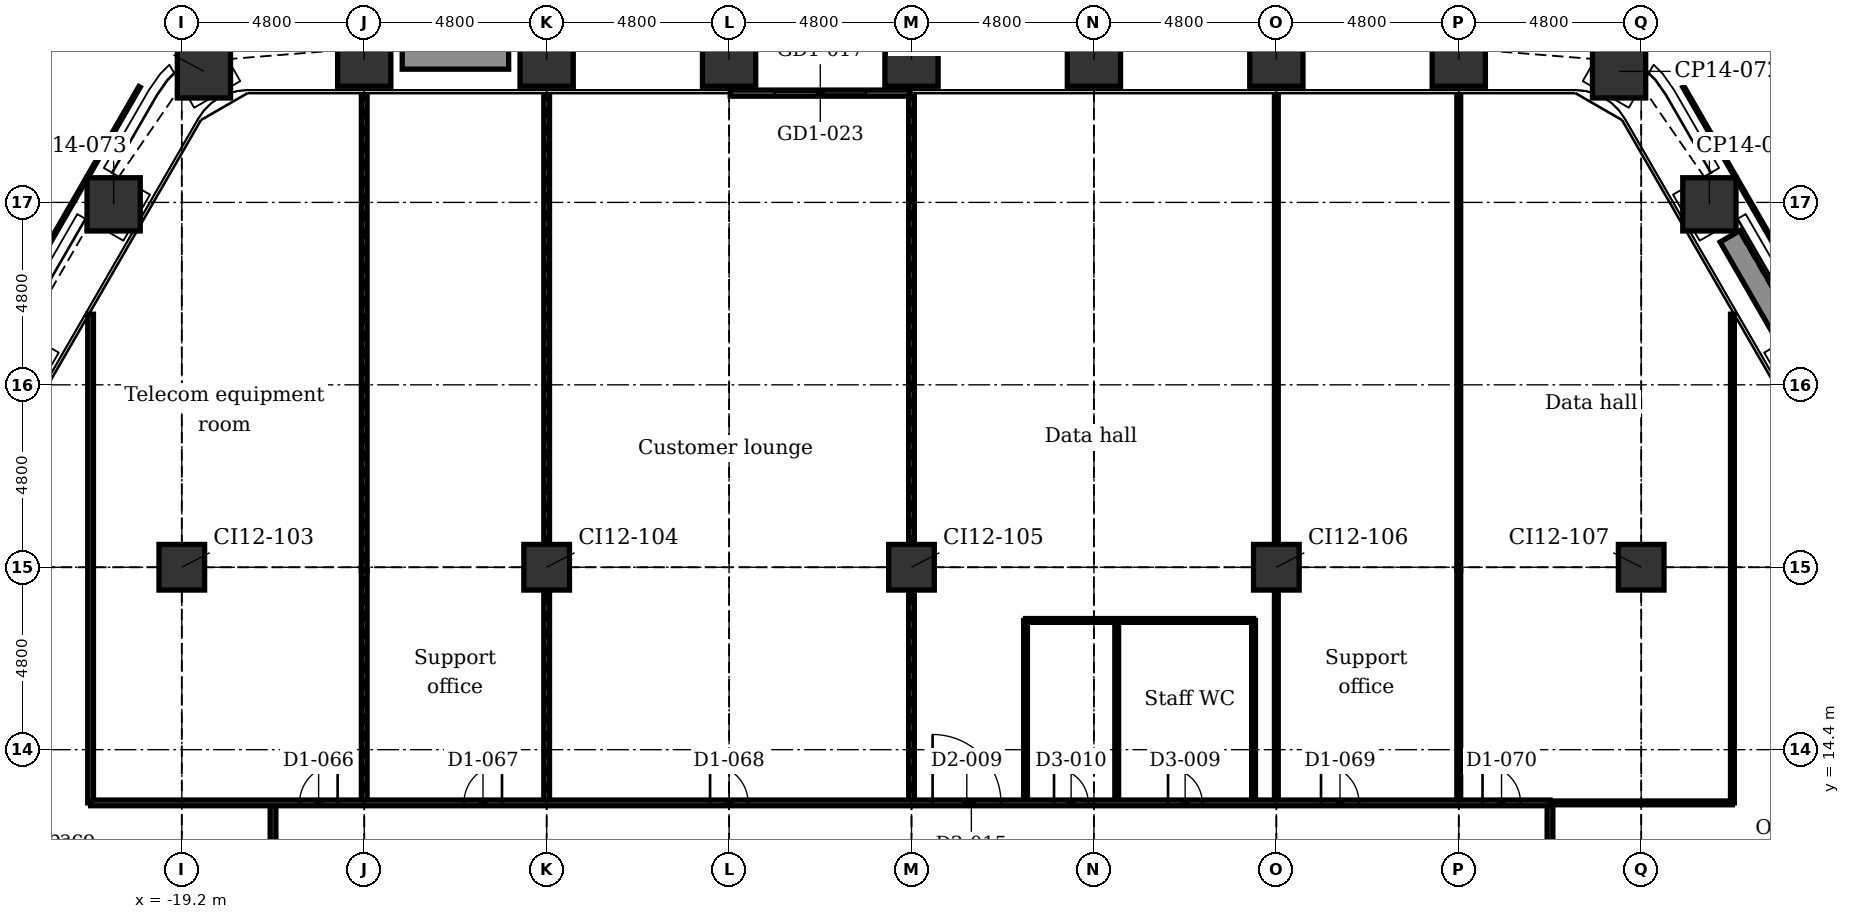
"""IFC4 building model, lengths in metres.
Left out: names, types, materials, properties, quantities, classifications, styles, units other than length and angle.
Written with IfcOpenShell. Run it as: python <this file> out.ifc"""

import sys

from ifc_helpers import new_model, si_unit, direction, frame, frame_2d, origin, origin_2d, place, context, subcontext, project, spatial, rectangle, extrude, element, fill, save


model = new_model("IFC4")
c1 = context("Model", 3, precision=1e-05, world=origin(), true_north=direction((0.0, 1.0)))
c2 = subcontext(c1, "Body", "Model", "MODEL_VIEW")
j1 = project(units=[si_unit("LENGTHUNIT", "METRE"), si_unit("PLANEANGLEUNIT", "RADIAN")], contexts=[c1])
p1 = place(None, origin())
s1 = spatial("IfcSite", under=j1, at=p1, CompositionType="ELEMENT")
p2 = place(p1, origin())
s2 = spatial("IfcBuilding", under=s1, at=p2, CompositionType="ELEMENT")
p3 = place(p2, frame((0.0, 0.0, 22.4)))
s3 = spatial("IfcBuildingStorey", under=s2, at=p3, CompositionType="ELEMENT", Elevation=22.4)
for number, where, z_axis, x_axis in (
    (1, (-18.618, 32.247, -0.25), (0.0, 0.0, 1.0), (0.866, 0.5, 0.0)),
    (2, (-14.4, 32.555, -0.25), (0.0, 0.0, 1.0), (1.0, 0.0, 0.0)),
    (3, (-9.6, 32.555, -0.25), (0.0, 0.0, 1.0), (1.0, 0.0, 0.0)),
    (4, (-4.8, 32.555, -0.25), (0.0, 0.0, 1.0), (1.0, 0.0, 0.0)),
    (5, (0.0, 32.555, -0.25), (0.0, 0.0, 1.0), (1.0, 0.0, 0.0)),
    (6, (4.8, 32.555, -0.25), (0.0, 0.0, 1.0), (1.0, 0.0, 0.0)),
    (7, (9.6, 32.555, -0.25), (0.0, 0.0, 1.0), (1.0, 0.0, 0.0)),
    (8, (14.4, 32.555, -0.25), (0.0, 0.0, 1.0), (1.0, 0.0, 0.0)),
    (9, (18.618, 32.247, -0.25), (0.0, 0.0, 1.0), (0.5, 0.866, 0.0)),
    (10, (20.994, 28.749, -0.25), (0.0, 0.0, 1.0), (0.866, 0.5, 0.0)),
    (11, (23.394, 24.592, -0.25), (0.0, 0.0, 1.0), (0.866, 0.5, 0.0)),
    (12, (-23.394, 24.592, -0.25), (0.0, 0.0, 1.0), (0.5, 0.866, 0.0)),
    (13, (-20.994, 28.749, -0.25), (0.0, 0.0, 1.0), (0.5, 0.866, 0.0)),
):
    element("IfcColumn", number, at=place(p3, frame(where, z_axis=z_axis, x_axis=x_axis)), inside=s3, PredefinedType="COLUMN", context=c2, shape_type="SweptSolid", body=[
        extrude(rectangle(XDim=1.4, YDim=1.4, at=origin_2d()), origin(), (0.0, 0.0, 1.0), 5.5),
    ])
for number, where, z_axis, x_axis in (
    (14, (-19.2, 19.2, -0.25), (0.0, 0.0, 1.0), (1.0, 0.0, 0.0)),
    (15, (-9.6, 19.2, -0.25), (0.0, 0.0, 1.0), (1.0, 0.0, 0.0)),
    (16, (0.0, 19.2, -0.25), (0.0, 0.0, 1.0), (1.0, 0.0, 0.0)),
    (17, (9.6, 19.2, -0.25), (0.0, 0.0, 1.0), (1.0, 0.0, 0.0)),
    (18, (19.2, 19.2, -0.25), (0.0, 0.0, 1.0), (1.0, 0.0, 0.0)),
):
    element("IfcColumn", number, at=place(p3, frame(where, z_axis=z_axis, x_axis=x_axis)), inside=s3, PredefinedType="COLUMN", context=c2, shape_type="SweptSolid", body=[
        extrude(rectangle(XDim=1.2, YDim=1.2, at=origin_2d()), origin(), (0.0, 0.0, 1.0), 5.5),
    ])
p4 = place(p3, frame((-4.77, 31.675, 0.0), z_axis=(0.0, 0.0, 1.0), x_axis=(1.0, 0.0, 0.0)))
e19 = element("IfcWall", 19, at=p4, inside=s3, PredefinedType="PARTITIONING", context=c2, shape_type="SweptSolid", body=[
    extrude(rectangle(XDim=4.74, YDim=0.16, at=frame_2d((2.37, 0.0))), origin(), (0.0, 0.0, 1.0), 5.25),
])
p5 = place(p4, frame((1.17, 0.0, 0.0)))
e20 = element("IfcOpeningElement", 20, at=p5, cuts=e19, PredefinedType="OPENING", context=c2, shape_type="SweptSolid", body=[
    extrude(rectangle(XDim=2.4, YDim=2.4, at=frame_2d((1.2, 1.2))), frame((0.0, 0.09, 0.0), z_axis=(0.0, -1.0, 0.0), x_axis=(1.0, 0.0, 0.0)), (0.0, 0.0, 1.0), 0.18),
])
for number, where, z_axis, x_axis in (
    (21, (-13.4, 32.605, 0.0), (0.0, 0.0, 1.0), (1.0, 0.0, 0.0)),
    (22, (21.537, 27.907, 0.0), (0.0, 0.0, 1.0), (0.5, -0.866, 0.0)),
):
    element("IfcWall", number, at=place(p3, frame(where, z_axis=z_axis, x_axis=x_axis)), inside=s3, PredefinedType="USERDEFINED", context=c2, shape_type="SweptSolid", body=[
        extrude(rectangle(XDim=2.8, YDim=0.6, at=frame_2d((1.4, 0.0))), origin(), (0.0, 0.0, 1.0), 0.7),
    ])
p6 = place(p3, frame((21.6, 13.0, 0.0), z_axis=(0.0, 0.0, 1.0), x_axis=(0.0, 1.0, 0.0)))
e23 = element("IfcWall", 23, at=p6, inside=s3, PredefinedType="PARTITIONING", context=c2, shape_type="SweptSolid", body=[
    extrude(rectangle(XDim=12.858, YDim=0.1, at=frame_2d((6.429, 0.0))), origin(), (0.0, 0.0, 1.0), 5.25),
])
p7 = place(p3, frame((16.8, 3.95, 0.0), z_axis=(0.0, 0.0, 1.0), x_axis=(0.0, 1.0, 0.0)))
e24 = element("IfcWall", 24, at=p7, inside=s3, PredefinedType="PARTITIONING", context=c2, shape_type="SweptSolid", body=[
    extrude(rectangle(XDim=9.05, YDim=0.15, at=frame_2d((4.525, 0.0))), origin(), (0.0, 0.0, 1.0), 5.25),
])
p8 = place(p7, frame((0.755, 0.0, 0.0)))
e25 = element("IfcOpeningElement", 25, at=p8, cuts=e24, PredefinedType="OPENING", context=c2, shape_type="SweptSolid", body=[
    extrude(rectangle(XDim=1.0, YDim=2.1, at=frame_2d((0.5, 1.05))), frame((0.0, 0.085, 0.0), z_axis=(0.0, -1.0, 0.0), x_axis=(1.0, 0.0, 0.0)), (0.0, 0.0, 1.0), 0.17),
])
p9 = place(p7, frame((3.85, 0.0, 0.0)))
e26 = element("IfcOpeningElement", 26, at=p9, cuts=e24, PredefinedType="OPENING", context=c2, shape_type="SweptSolid", body=[
    extrude(rectangle(XDim=1.0, YDim=2.1, at=frame_2d((0.5, 1.05))), frame((0.0, 0.085, 0.0), z_axis=(0.0, -1.0, 0.0), x_axis=(1.0, 0.0, 0.0)), (0.0, 0.0, 1.0), 0.17),
])
p10 = place(p7, frame((7.05, 0.0, 0.0)))
e27 = element("IfcOpeningElement", 27, at=p10, cuts=e24, PredefinedType="OPENING", context=c2, shape_type="SweptSolid", body=[
    extrude(rectangle(XDim=1.0, YDim=2.1, at=frame_2d((0.5, 1.05))), frame((0.0, 0.085, 0.0), z_axis=(0.0, -1.0, 0.0), x_axis=(1.0, 0.0, 0.0)), (0.0, 0.0, 1.0), 0.17),
])
p11 = place(p3, frame((14.4, 19.113, 0.0), z_axis=(0.0, 0.0, 1.0), x_axis=(0.0, 1.0, 0.0)))
e28 = element("IfcWall", 28, at=p11, inside=s3, PredefinedType="PARTITIONING", context=c2, shape_type="SweptSolid", body=[
    extrude(rectangle(XDim=12.472, YDim=0.1, at=frame_2d((6.236, 0.0))), origin(), (0.0, 0.0, 1.0), 4.566),
])
p12 = place(p3, frame((14.4, 13.0, 0.0), z_axis=(0.0, 0.0, 1.0), x_axis=(0.0, 1.0, 0.0)))
e29 = element("IfcWall", 29, at=p12, inside=s3, PredefinedType="PARTITIONING", context=c2, shape_type="SweptSolid", body=[
    extrude(rectangle(XDim=6.113, YDim=0.1, at=frame_2d((3.057, 0.0))), origin(), (0.0, 0.0, 1.0), 4.793),
])
p13 = place(p3, frame((9.6, 13.0, 0.0), z_axis=(0.0, 0.0, 1.0), x_axis=(0.0, 1.0, 0.0)))
e30 = element("IfcWall", 30, at=p13, inside=s3, PredefinedType="PARTITIONING", context=c2, shape_type="SweptSolid", body=[
    extrude(rectangle(XDim=5.6, YDim=0.1, at=frame_2d((2.8, 0.0))), origin(), (0.0, 0.0, 1.0), 4.793),
])
p14 = place(p3, frame((9.6, 19.8, 0.0), z_axis=(0.0, 0.0, 1.0), x_axis=(0.0, 1.0, 0.0)))
e31 = element("IfcWall", 31, at=p14, inside=s3, PredefinedType="PARTITIONING", context=c2, shape_type="SweptSolid", body=[
    extrude(rectangle(XDim=11.785, YDim=0.1, at=frame_2d((5.893, 0.0))), origin(), (0.0, 0.0, 1.0), 4.642),
])
for number, where, z_axis, x_axis in (
    (32, (9.0, 13.0, 0.0), (0.0, 0.0, 1.0), (0.0, 1.0, 0.0)),
    (33, (5.4, 13.0, 0.0), (0.0, 0.0, 1.0), (0.0, 1.0, 0.0)),
    (34, (3.0, 13.0, 0.0), (0.0, 0.0, 1.0), (0.0, 1.0, 0.0)),
):
    element("IfcWall", number, at=place(p3, frame(where, z_axis=z_axis, x_axis=x_axis)), inside=s3, PredefinedType="PARTITIONING", context=c2, shape_type="SweptSolid", body=[
        extrude(rectangle(XDim=4.8, YDim=0.1, at=frame_2d((2.4, 0.0))), origin(), (0.0, 0.0, 1.0), 5.25),
    ])
p15 = place(p3, frame((0.0, 13.0, 0.0), z_axis=(0.0, 0.0, 1.0), x_axis=(0.0, 1.0, 0.0)))
e35 = element("IfcWall", 35, at=p15, inside=s3, PredefinedType="PARTITIONING", context=c2, shape_type="SweptSolid", body=[
    extrude(rectangle(XDim=5.6, YDim=0.15, at=frame_2d((2.8, 0.0))), origin(), (0.0, 0.0, 1.0), 4.793),
])
p16 = place(p3, frame((0.0, 19.8, 0.0), z_axis=(0.0, 0.0, 1.0), x_axis=(0.0, 1.0, 0.0)))
e36 = element("IfcWall", 36, at=p16, inside=s3, PredefinedType="PARTITIONING", context=c2, shape_type="SweptSolid", body=[
    extrude(rectangle(XDim=11.795, YDim=0.15, at=frame_2d((5.898, 0.0))), origin(), (0.0, 0.0, 1.0), 4.642),
])
p17 = place(p3, frame((-9.6, 13.0, 0.0), z_axis=(0.0, 0.0, 1.0), x_axis=(0.0, 1.0, 0.0)))
e37 = element("IfcWall", 37, at=p17, inside=s3, PredefinedType="PARTITIONING", context=c2, shape_type="SweptSolid", body=[
    extrude(rectangle(XDim=5.6, YDim=0.15, at=frame_2d((2.8, 0.0))), origin(), (0.0, 0.0, 1.0), 4.793),
])
p18 = place(p3, frame((-9.6, 19.8, 0.0), z_axis=(0.0, 0.0, 1.0), x_axis=(0.0, 1.0, 0.0)))
e38 = element("IfcWall", 38, at=p18, inside=s3, PredefinedType="PARTITIONING", context=c2, shape_type="SweptSolid", body=[
    extrude(rectangle(XDim=11.785, YDim=0.15, at=frame_2d((5.893, 0.0))), origin(), (0.0, 0.0, 1.0), 4.642),
])
p19 = place(p3, frame((-14.4, 19.113, 0.0), z_axis=(0.0, 0.0, 1.0), x_axis=(0.0, 1.0, 0.0)))
e39 = element("IfcWall", 39, at=p19, inside=s3, PredefinedType="PARTITIONING", context=c2, shape_type="SweptSolid", body=[
    extrude(rectangle(XDim=12.472, YDim=0.15, at=frame_2d((6.236, 0.0))), origin(), (0.0, 0.0, 1.0), 4.566),
])
p20 = place(p3, frame((-14.4, 13.0, 0.0), z_axis=(0.0, 0.0, 1.0), x_axis=(0.0, 1.0, 0.0)))
e40 = element("IfcWall", 40, at=p20, inside=s3, PredefinedType="PARTITIONING", context=c2, shape_type="SweptSolid", body=[
    extrude(rectangle(XDim=6.113, YDim=0.15, at=frame_2d((3.057, 0.0))), origin(), (0.0, 0.0, 1.0), 4.793),
])
p21 = place(p3, frame((-16.8, 3.95, 0.0), z_axis=(0.0, 0.0, 1.0), x_axis=(0.0, 1.0, 0.0)))
e41 = element("IfcWall", 41, at=p21, inside=s3, PredefinedType="PARTITIONING", context=c2, shape_type="SweptSolid", body=[
    extrude(rectangle(XDim=9.05, YDim=0.15, at=frame_2d((4.525, 0.0))), origin(), (0.0, 0.0, 1.0), 5.25),
])
p22 = place(p21, frame((0.95, 0.0, 0.0)))
e42 = element("IfcOpeningElement", 42, at=p22, cuts=e41, PredefinedType="OPENING", context=c2, shape_type="SweptSolid", body=[
    extrude(rectangle(XDim=1.0, YDim=2.1, at=frame_2d((0.5, 1.05))), frame((0.0, 0.085, 0.0), z_axis=(0.0, -1.0, 0.0), x_axis=(1.0, 0.0, 0.0)), (0.0, 0.0, 1.0), 0.17),
])
p23 = place(p21, frame((3.955, 0.0, 0.0)))
e43 = element("IfcOpeningElement", 43, at=p23, cuts=e41, PredefinedType="OPENING", context=c2, shape_type="SweptSolid", body=[
    extrude(rectangle(XDim=1.0, YDim=2.1, at=frame_2d((0.5, 1.05))), frame((0.0, 0.085, 0.0), z_axis=(0.0, -1.0, 0.0), x_axis=(1.0, 0.0, 0.0)), (0.0, 0.0, 1.0), 0.17),
])
p24 = place(p21, frame((7.05, 0.0, 0.0)))
e44 = element("IfcOpeningElement", 44, at=p24, cuts=e41, PredefinedType="OPENING", context=c2, shape_type="SweptSolid", body=[
    extrude(rectangle(XDim=1.0, YDim=2.1, at=frame_2d((0.5, 1.05))), frame((0.0, 0.085, 0.0), z_axis=(0.0, -1.0, 0.0), x_axis=(1.0, 0.0, 0.0)), (0.0, 0.0, 1.0), 0.17),
])
p25 = place(p3, frame((-21.6, 13.0, 0.0), z_axis=(0.0, 0.0, 1.0), x_axis=(0.0, 1.0, 0.0)))
e45 = element("IfcWall", 45, at=p25, inside=s3, PredefinedType="PARTITIONING", context=c2, shape_type="SweptSolid", body=[
    extrude(rectangle(XDim=12.858, YDim=0.15, at=frame_2d((6.429, 0.0))), origin(), (0.0, 0.0, 1.0), 5.25),
])
p26 = place(p3, frame((16.8, 13.0, 0.0), z_axis=(0.0, 0.0, 1.0), x_axis=(1.0, 0.0, 0.0)))
e46 = element("IfcWall", 46, at=p26, inside=s3, PredefinedType="PARTITIONING", context=c2, shape_type="SweptSolid", body=[
    extrude(rectangle(XDim=4.8, YDim=0.1, at=frame_2d((2.4, 0.0))), origin(), (0.0, 0.0, 1.0), 5.25),
])
p27 = place(p3, frame((-21.6, 13.0, 0.0), z_axis=(0.0, 0.0, 1.0), x_axis=(1.0, 0.0, 0.0)))
e47 = element("IfcWall", 47, at=p27, inside=s3, PredefinedType="PARTITIONING", context=c2, shape_type="SweptSolid", body=[
    extrude(rectangle(XDim=38.4, YDim=0.15, at=frame_2d((19.2, 0.0))), origin(), (0.0, 0.0, 1.0), 5.25),
])
p28 = place(p27, frame((5.5, 0.0, 0.0)))
e48 = element("IfcOpeningElement", 48, at=p28, cuts=e47, PredefinedType="OPENING", context=c2, shape_type="SweptSolid", body=[
    extrude(rectangle(XDim=1.0, YDim=2.1, at=frame_2d((0.5, 1.05))), frame((0.0, 0.085, 0.0), z_axis=(0.0, -1.0, 0.0), x_axis=(1.0, 0.0, 0.0)), (0.0, 0.0, 1.0), 0.17),
])
p29 = place(p27, frame((9.825, 0.0, 0.0)))
e49 = element("IfcOpeningElement", 49, at=p29, cuts=e47, PredefinedType="OPENING", context=c2, shape_type="SweptSolid", body=[
    extrude(rectangle(XDim=1.0, YDim=2.1, at=frame_2d((0.5, 1.05))), frame((0.0, 0.085, 0.0), z_axis=(0.0, -1.0, 0.0), x_axis=(1.0, 0.0, 0.0)), (0.0, 0.0, 1.0), 0.17),
])
p30 = place(p27, frame((16.3, 0.0, 0.0)))
e50 = element("IfcOpeningElement", 50, at=p30, cuts=e47, PredefinedType="OPENING", context=c2, shape_type="SweptSolid", body=[
    extrude(rectangle(XDim=1.0, YDim=2.1, at=frame_2d((0.5, 1.05))), frame((0.0, 0.085, 0.0), z_axis=(0.0, -1.0, 0.0), x_axis=(1.0, 0.0, 0.0)), (0.0, 0.0, 1.0), 0.17),
])
p31 = place(p27, frame((22.155, 0.0, 0.0)))
e51 = element("IfcOpeningElement", 51, at=p31, cuts=e47, PredefinedType="OPENING", context=c2, shape_type="SweptSolid", body=[
    extrude(rectangle(XDim=1.8, YDim=2.1, at=frame_2d((0.9, 1.05))), frame((0.0, 0.085, 0.0), z_axis=(0.0, -1.0, 0.0), x_axis=(1.0, 0.0, 0.0)), (0.0, 0.0, 1.0), 0.17),
])
p32 = place(p27, frame((32.375, 0.0, 0.0)))
e52 = element("IfcOpeningElement", 52, at=p32, cuts=e47, PredefinedType="OPENING", context=c2, shape_type="SweptSolid", body=[
    extrude(rectangle(XDim=1.0, YDim=2.1, at=frame_2d((0.5, 1.05))), frame((0.0, 0.085, 0.0), z_axis=(0.0, -1.0, 0.0), x_axis=(1.0, 0.0, 0.0)), (0.0, 0.0, 1.0), 0.17),
])
p33 = place(p27, frame((36.625, 0.0, 0.0)))
e53 = element("IfcOpeningElement", 53, at=p33, cuts=e47, PredefinedType="OPENING", context=c2, shape_type="SweptSolid", body=[
    extrude(rectangle(XDim=1.0, YDim=2.1, at=frame_2d((0.5, 1.05))), frame((0.0, 0.085, 0.0), z_axis=(0.0, -1.0, 0.0), x_axis=(1.0, 0.0, 0.0)), (0.0, 0.0, 1.0), 0.17),
])
p34 = place(p27, frame((28.35, 0.0, 0.0)))
e54 = element("IfcOpeningElement", 54, at=p34, cuts=e47, PredefinedType="OPENING", context=c2, shape_type="SweptSolid", body=[
    extrude(rectangle(XDim=0.9, YDim=2.1, at=frame_2d((0.45, 1.05))), frame((0.0, 0.085, 0.0), z_axis=(0.0, -1.0, 0.0), x_axis=(1.0, 0.0, 0.0)), (0.0, 0.0, 1.0), 0.17),
])
p35 = place(p27, frame((25.35, 0.0, 0.0)))
e55 = element("IfcOpeningElement", 55, at=p35, cuts=e47, PredefinedType="OPENING", context=c2, shape_type="SweptSolid", body=[
    extrude(rectangle(XDim=0.9, YDim=2.1, at=frame_2d((0.45, 1.05))), frame((0.0, 0.085, 0.0), z_axis=(0.0, -1.0, 0.0), x_axis=(1.0, 0.0, 0.0)), (0.0, 0.0, 1.0), 0.17),
])
p36 = place(p3, frame((3.0, 17.8, 0.0), z_axis=(0.0, 0.0, 1.0), x_axis=(1.0, 0.0, 0.0)))
e56 = element("IfcWall", 56, at=p36, inside=s3, PredefinedType="PARTITIONING", context=c2, shape_type="SweptSolid", body=[
    extrude(rectangle(XDim=6.0, YDim=0.1, at=frame_2d((3.0, 0.0))), origin(), (0.0, 0.0, 1.0), 5.25),
])
p37 = place(p5, origin())
e57 = element("IfcDoor", 57, at=p37, inside=s3, OperationType="DOUBLE_DOOR_SLIDING", PredefinedType="DOOR", context=c2, shape_type="SweptSolid", body=[
    extrude(rectangle(XDim=2.4, YDim=2.4, at=frame_2d((1.2, 1.2))), frame((0.0, 0.025, 0.0), z_axis=(0.0, -1.0, 0.0), x_axis=(1.0, 0.0, 0.0)), (0.0, 0.0, 1.0), 0.05),
])
fill(e20, e57)
p38 = place(p28, origin())
e58 = element("IfcDoor", 58, at=p38, inside=s3, OperationType="SINGLE_SWING_RIGHT", PredefinedType="DOOR", context=c2, shape_type="SweptSolid", body=[
    extrude(rectangle(XDim=1.0, YDim=2.1, at=frame_2d((0.5, 1.05))), frame((0.0, 0.025, 0.0), z_axis=(0.0, -1.0, 0.0), x_axis=(1.0, 0.0, 0.0)), (0.0, 0.0, 1.0), 0.05),
])
fill(e48, e58)
p39 = place(p29, origin())
e59 = element("IfcDoor", 59, at=p39, inside=s3, OperationType="SINGLE_SWING_RIGHT", PredefinedType="DOOR", context=c2, shape_type="SweptSolid", body=[
    extrude(rectangle(XDim=1.0, YDim=2.1, at=frame_2d((0.5, 1.05))), frame((0.0, 0.025, 0.0), z_axis=(0.0, -1.0, 0.0), x_axis=(1.0, 0.0, 0.0)), (0.0, 0.0, 1.0), 0.05),
])
fill(e49, e59)
p40 = place(p30, origin())
e60 = element("IfcDoor", 60, at=p40, inside=s3, OperationType="SINGLE_SWING_LEFT", PredefinedType="DOOR", context=c2, shape_type="SweptSolid", body=[
    extrude(rectangle(XDim=1.0, YDim=2.1, at=frame_2d((0.5, 1.05))), frame((0.0, 0.025, 0.0), z_axis=(0.0, -1.0, 0.0), x_axis=(1.0, 0.0, 0.0)), (0.0, 0.0, 1.0), 0.05),
])
fill(e50, e60)
p41 = place(p31, origin())
e61 = element("IfcDoor", 61, at=p41, inside=s3, OperationType="SINGLE_SWING_LEFT", PredefinedType="DOOR", context=c2, shape_type="SweptSolid", body=[
    extrude(rectangle(XDim=1.8, YDim=2.1, at=frame_2d((0.9, 1.05))), frame((0.0, 0.025, 0.0), z_axis=(0.0, -1.0, 0.0), x_axis=(1.0, 0.0, 0.0)), (0.0, 0.0, 1.0), 0.05),
])
fill(e51, e61)
p42 = place(p32, origin())
e62 = element("IfcDoor", 62, at=p42, inside=s3, OperationType="SINGLE_SWING_LEFT", PredefinedType="DOOR", context=c2, shape_type="SweptSolid", body=[
    extrude(rectangle(XDim=1.0, YDim=2.1, at=frame_2d((0.5, 1.05))), frame((0.0, 0.025, 0.0), z_axis=(0.0, -1.0, 0.0), x_axis=(1.0, 0.0, 0.0)), (0.0, 0.0, 1.0), 0.05),
])
fill(e52, e62)
p43 = place(p33, origin())
e63 = element("IfcDoor", 63, at=p43, inside=s3, OperationType="SINGLE_SWING_LEFT", PredefinedType="DOOR", context=c2, shape_type="SweptSolid", body=[
    extrude(rectangle(XDim=1.0, YDim=2.1, at=frame_2d((0.5, 1.05))), frame((0.0, 0.025, 0.0), z_axis=(0.0, -1.0, 0.0), x_axis=(1.0, 0.0, 0.0)), (0.0, 0.0, 1.0), 0.05),
])
fill(e53, e63)
p44 = place(p34, origin())
e64 = element("IfcDoor", 64, at=p44, inside=s3, OperationType="SINGLE_SWING_LEFT", PredefinedType="DOOR", context=c2, shape_type="SweptSolid", body=[
    extrude(rectangle(XDim=0.9, YDim=2.1, at=frame_2d((0.45, 1.05))), frame((0.0, 0.025, 0.0), z_axis=(0.0, -1.0, 0.0), x_axis=(1.0, 0.0, 0.0)), (0.0, 0.0, 1.0), 0.05),
])
fill(e54, e64)
p45 = place(p35, origin())
e65 = element("IfcDoor", 65, at=p45, inside=s3, OperationType="SINGLE_SWING_LEFT", PredefinedType="DOOR", context=c2, shape_type="SweptSolid", body=[
    extrude(rectangle(XDim=0.9, YDim=2.1, at=frame_2d((0.45, 1.05))), frame((0.0, 0.025, 0.0), z_axis=(0.0, -1.0, 0.0), x_axis=(1.0, 0.0, 0.0)), (0.0, 0.0, 1.0), 0.05),
])
fill(e55, e65)
save(model, sys.argv[1])
